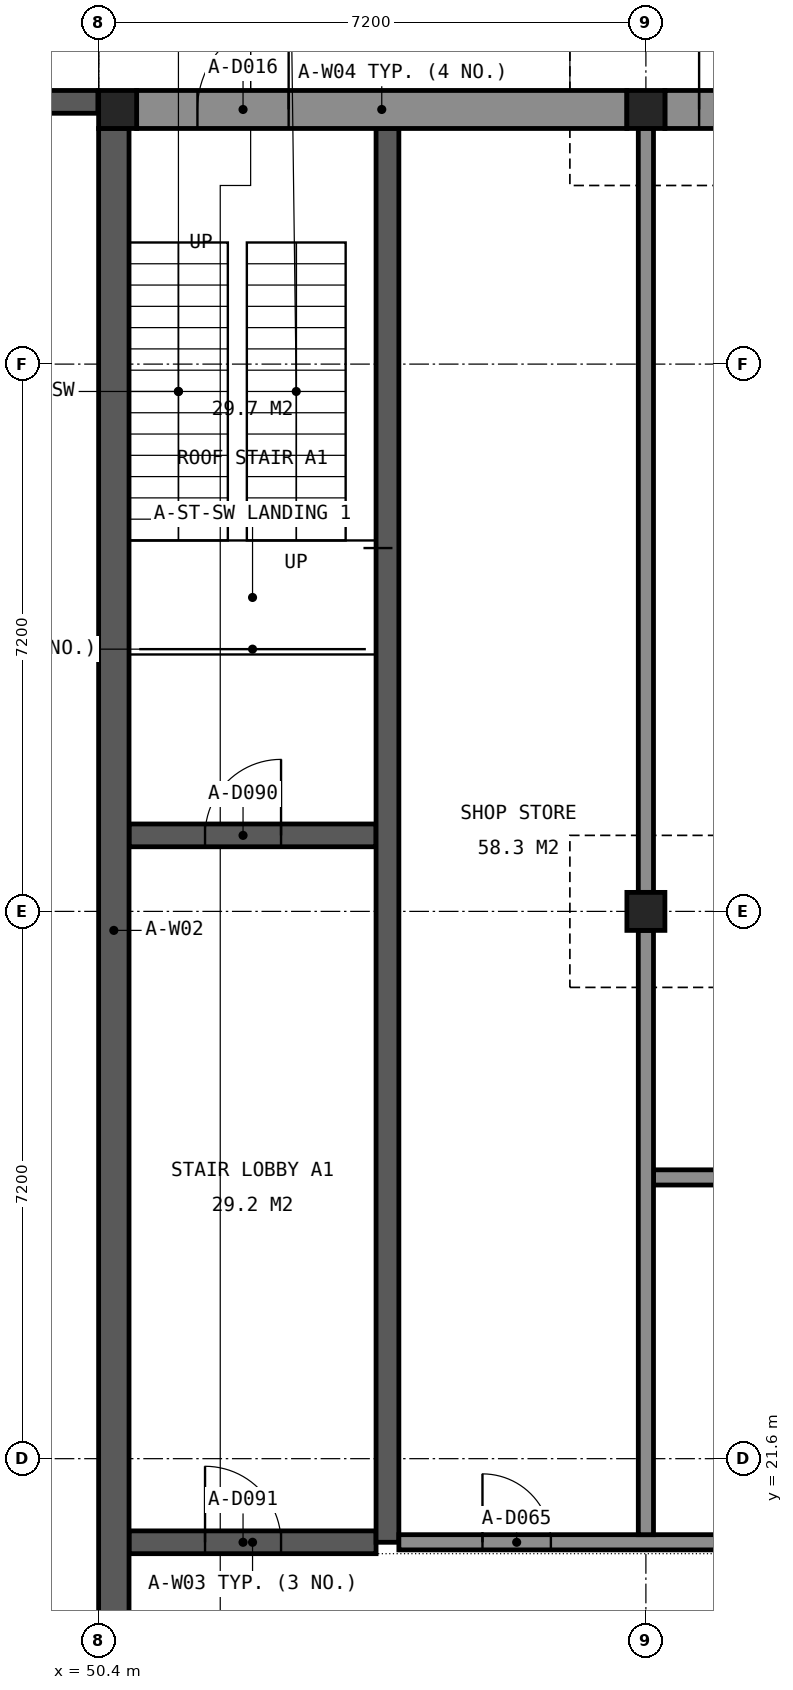
"""IFC4 building model, lengths in metres.
Left out: names, types, materials, properties, quantities, classifications, styles, units other than length and angle.
Written with IfcOpenShell. Run it as: python <this file> out.ifc"""

import sys

from ifc_helpers import new_model, si_unit, direction, frame, frame_2d, origin, origin_2d, place, context, subcontext, project, spatial, rectangle, extrude, element, fill, save


model = new_model("IFC4")
c1 = context("Model", 3, precision=1e-05, world=origin(), true_north=direction((0.0, 1.0)))
c2 = subcontext(c1, "Body", "Model", "MODEL_VIEW")
j1 = project(units=[si_unit("LENGTHUNIT", "METRE"), si_unit("PLANEANGLEUNIT", "RADIAN")], contexts=[c1])
p1 = place(None, origin())
s1 = spatial("IfcSite", under=j1, at=p1, CompositionType="ELEMENT")
p2 = place(p1, origin())
s2 = spatial("IfcBuilding", under=s1, at=p2, CompositionType="ELEMENT")
p3 = place(p2, origin())
s3 = spatial("IfcBuildingStorey", under=s2, at=p3, CompositionType="ELEMENT", Elevation=0.0)
for number, where, z_axis, x_axis in (
    (1, (50.65, 39.35, 0.0), (0.0, 0.0, 1.0), (1.0, 0.0, 0.0)),
    (2, (57.6, 39.35, 0.0), (0.0, 0.0, 1.0), (1.0, 0.0, 0.0)),
    (3, (57.6, 28.8, 0.0), (0.0, 0.0, 1.0), (1.0, 0.0, 0.0)),
):
    element("IfcColumn", number, at=place(p3, frame(where, z_axis=z_axis, x_axis=x_axis)), inside=s3, PredefinedType="COLUMN", context=c2, shape_type="SweptSolid", body=[
        extrude(rectangle(XDim=0.5, YDim=0.5, at=origin_2d()), origin(), (0.0, 0.0, 1.0), 3.7),
    ])
p4 = place(p3, frame((50.8, 20.5, 0.0), z_axis=(0.0, 0.0, 1.0), x_axis=(1.0, 0.0, 0.0)))
e4 = element("IfcWall", 4, at=p4, inside=s3, PredefinedType="SHEAR", context=c2, shape_type="SweptSolid", body=[
    extrude(rectangle(XDim=3.25, YDim=0.3, at=frame_2d((1.625, 0.0))), origin(), (0.0, 0.0, 1.0), 4.4),
])
p5 = place(p4, frame((1.0, 0.0, 0.0)))
e5 = element("IfcOpeningElement", 5, at=p5, cuts=e4, PredefinedType="OPENING", context=c2, shape_type="SweptSolid", body=[
    extrude(rectangle(XDim=1.0, YDim=2.1, at=frame_2d((0.5, 1.05))), frame((0.0, 0.16, 0.0), z_axis=(0.0, -1.0, 0.0), x_axis=(1.0, 0.0, 0.0)), (0.0, 0.0, 1.0), 0.32),
])
p6 = place(p3, frame((50.8, 29.8, 0.0), z_axis=(0.0, 0.0, 1.0), x_axis=(1.0, 0.0, 0.0)))
e6 = element("IfcWall", 6, at=p6, inside=s3, PredefinedType="SHEAR", context=c2, shape_type="SweptSolid", body=[
    extrude(rectangle(XDim=3.25, YDim=0.3, at=frame_2d((1.625, 0.0))), origin(), (0.0, 0.0, 1.0), 4.4),
])
p7 = place(p6, frame((1.0, 0.0, 0.0)))
e7 = element("IfcOpeningElement", 7, at=p7, cuts=e6, PredefinedType="OPENING", context=c2, shape_type="SweptSolid", body=[
    extrude(rectangle(XDim=1.0, YDim=2.1, at=frame_2d((0.5, 1.05))), frame((0.0, 0.16, 0.0), z_axis=(0.0, -1.0, 0.0), x_axis=(1.0, 0.0, 0.0)), (0.0, 0.0, 1.0), 0.32),
])
p8 = place(p3, frame((50.6, 18.0, 0.0), z_axis=(0.0, 0.0, 1.0), x_axis=(0.0, 1.0, 0.0)))
e8 = element("IfcWall", 8, at=p8, inside=s3, PredefinedType="SHEAR", context=c2, shape_type="SweptSolid", body=[
    extrude(rectangle(XDim=21.1, YDim=0.4, at=frame_2d((10.55, 0.0))), origin(), (0.0, 0.0, 1.0), 4.4),
])
p9 = place(p3, frame((54.2, 20.5, 0.0), z_axis=(0.0, 0.0, 1.0), x_axis=(0.0, 1.0, 0.0)))
e9 = element("IfcWall", 9, at=p9, inside=s3, PredefinedType="SHEAR", context=c2, shape_type="SweptSolid", body=[
    extrude(rectangle(XDim=18.6, YDim=0.3, at=frame_2d((9.3, 0.0))), origin(), (0.0, 0.0, 1.0), 4.4),
])
p10 = place(p3, frame((43.21, 39.45, -0.25), z_axis=(0.0, 0.0, 1.0), x_axis=(1.0, 0.0, 0.0)))
e10 = element("IfcWall", 10, at=p10, inside=s3, PredefinedType="SOLIDWALL", context=c2, shape_type="SweptSolid", body=[
    extrude(rectangle(XDim=7.18, YDim=0.3, at=frame_2d((3.59, 0.0))), origin(), (0.0, 0.0, 1.0), 6.15),
])
p11 = place(p3, frame((50.9, 39.35, 0.0), z_axis=(0.0, 0.0, 1.0), x_axis=(1.0, 0.0, 0.0)))
e11 = element("IfcWall", 11, at=p11, inside=s3, PredefinedType="SOLIDWALL", context=c2, shape_type="SweptSolid", body=[
    extrude(rectangle(XDim=6.45, YDim=0.5, at=frame_2d((3.225, 0.0))), origin(), (0.0, 0.0, 1.0), 3.6),
])
p12 = place(p11, frame((0.8, 0.0, 0.0)))
e12 = element("IfcOpeningElement", 12, at=p12, cuts=e11, PredefinedType="OPENING", context=c2, shape_type="SweptSolid", body=[
    extrude(rectangle(XDim=1.2, YDim=2.1, at=frame_2d((0.6, 1.05))), frame((0.0, 0.26, 0.0), z_axis=(0.0, -1.0, 0.0), x_axis=(1.0, 0.0, 0.0)), (0.0, 0.0, 1.0), 0.52),
])
p13 = place(p3, frame((57.85, 39.35, 0.0), z_axis=(0.0, 0.0, 1.0), x_axis=(1.0, 0.0, 0.0)))
e13 = element("IfcWall", 13, at=p13, inside=s3, PredefinedType="SOLIDWALL", context=c2, shape_type="SweptSolid", body=[
    extrude(rectangle(XDim=6.7, YDim=0.5, at=frame_2d((3.35, 0.0))), origin(), (0.0, 0.0, 1.0), 3.6),
])
p14 = place(p13, frame((0.45, 0.0, 0.0)))
e14 = element("IfcOpeningElement", 14, at=p14, cuts=e13, PredefinedType="OPENING", context=c2, shape_type="SweptSolid", body=[
    extrude(rectangle(XDim=1.8, YDim=2.4, at=frame_2d((0.9, 1.2))), frame((0.0, 0.26, 0.0), z_axis=(0.0, -1.0, 0.0), x_axis=(1.0, 0.0, 0.0)), (0.0, 0.0, 1.0), 0.52),
])
p15 = place(p13, frame((2.6, 0.0, 0.6)))
e15 = element("IfcOpeningElement", 15, at=p15, cuts=e13, PredefinedType="OPENING", context=c2, shape_type="SweptSolid", body=[
    extrude(rectangle(XDim=3.0, YDim=2.4, at=frame_2d((1.5, 1.2))), frame((0.0, 0.26, 0.0), z_axis=(0.0, -1.0, 0.0), x_axis=(1.0, 0.0, 0.0)), (0.0, 0.0, 1.0), 0.52),
])
p16 = place(p3, frame((54.35, 20.5, 0.0), z_axis=(0.0, 0.0, 1.0), x_axis=(1.0, 0.0, 0.0)))
e16 = element("IfcWall", 16, at=p16, inside=s3, PredefinedType="PARTITIONING", context=c2, shape_type="SweptSolid", body=[
    extrude(rectangle(XDim=92.9, YDim=0.2, at=frame_2d((46.45, 0.0))), origin(), (0.0, 0.0, 1.0), 3.5),
])
p17 = place(p16, frame((1.1, 0.0, 0.0)))
e17 = element("IfcOpeningElement", 17, at=p17, cuts=e16, PredefinedType="OPENING", context=c2, shape_type="SweptSolid", body=[
    extrude(rectangle(XDim=0.9, YDim=2.1, at=frame_2d((0.45, 1.05))), frame((0.0, 0.11, 0.0), z_axis=(0.0, -1.0, 0.0), x_axis=(1.0, 0.0, 0.0)), (0.0, 0.0, 1.0), 0.22),
])
p18 = place(p16, frame((90.9, 0.0, 0.0)))
e18 = element("IfcOpeningElement", 18, at=p18, cuts=e16, PredefinedType="OPENING", context=c2, shape_type="SweptSolid", body=[
    extrude(rectangle(XDim=0.9, YDim=2.1, at=frame_2d((0.45, 1.05))), frame((0.0, 0.11, 0.0), z_axis=(0.0, -1.0, 0.0), x_axis=(1.0, 0.0, 0.0)), (0.0, 0.0, 1.0), 0.22),
])
p19 = place(p16, frame((6.35, 0.0, 0.0)))
e19 = element("IfcOpeningElement", 19, at=p19, cuts=e16, PredefinedType="OPENING", context=c2, shape_type="SweptSolid", body=[
    extrude(rectangle(XDim=1.0, YDim=2.1, at=frame_2d((0.5, 1.05))), frame((0.0, 0.11, 0.0), z_axis=(0.0, -1.0, 0.0), x_axis=(1.0, 0.0, 0.0)), (0.0, 0.0, 1.0), 0.22),
])
p20 = place(p16, frame((13.55, 0.0, 0.0)))
e20 = element("IfcOpeningElement", 20, at=p20, cuts=e16, PredefinedType="OPENING", context=c2, shape_type="SweptSolid", body=[
    extrude(rectangle(XDim=1.0, YDim=2.1, at=frame_2d((0.5, 1.05))), frame((0.0, 0.11, 0.0), z_axis=(0.0, -1.0, 0.0), x_axis=(1.0, 0.0, 0.0)), (0.0, 0.0, 1.0), 0.22),
])
p21 = place(p16, frame((20.75, 0.0, 0.0)))
e21 = element("IfcOpeningElement", 21, at=p21, cuts=e16, PredefinedType="OPENING", context=c2, shape_type="SweptSolid", body=[
    extrude(rectangle(XDim=1.0, YDim=2.1, at=frame_2d((0.5, 1.05))), frame((0.0, 0.11, 0.0), z_axis=(0.0, -1.0, 0.0), x_axis=(1.0, 0.0, 0.0)), (0.0, 0.0, 1.0), 0.22),
])
p22 = place(p16, frame((27.95, 0.0, 0.0)))
e22 = element("IfcOpeningElement", 22, at=p22, cuts=e16, PredefinedType="OPENING", context=c2, shape_type="SweptSolid", body=[
    extrude(rectangle(XDim=1.0, YDim=2.1, at=frame_2d((0.5, 1.05))), frame((0.0, 0.11, 0.0), z_axis=(0.0, -1.0, 0.0), x_axis=(1.0, 0.0, 0.0)), (0.0, 0.0, 1.0), 0.22),
])
p23 = place(p16, frame((35.15, 0.0, 0.0)))
e23 = element("IfcOpeningElement", 23, at=p23, cuts=e16, PredefinedType="OPENING", context=c2, shape_type="SweptSolid", body=[
    extrude(rectangle(XDim=1.0, YDim=2.1, at=frame_2d((0.5, 1.05))), frame((0.0, 0.11, 0.0), z_axis=(0.0, -1.0, 0.0), x_axis=(1.0, 0.0, 0.0)), (0.0, 0.0, 1.0), 0.22),
])
p24 = place(p16, frame((42.35, 0.0, 0.0)))
e24 = element("IfcOpeningElement", 24, at=p24, cuts=e16, PredefinedType="OPENING", context=c2, shape_type="SweptSolid", body=[
    extrude(rectangle(XDim=1.0, YDim=2.1, at=frame_2d((0.5, 1.05))), frame((0.0, 0.11, 0.0), z_axis=(0.0, -1.0, 0.0), x_axis=(1.0, 0.0, 0.0)), (0.0, 0.0, 1.0), 0.22),
])
p25 = place(p16, frame((49.55, 0.0, 0.0)))
e25 = element("IfcOpeningElement", 25, at=p25, cuts=e16, PredefinedType="OPENING", context=c2, shape_type="SweptSolid", body=[
    extrude(rectangle(XDim=1.0, YDim=2.1, at=frame_2d((0.5, 1.05))), frame((0.0, 0.11, 0.0), z_axis=(0.0, -1.0, 0.0), x_axis=(1.0, 0.0, 0.0)), (0.0, 0.0, 1.0), 0.22),
])
p26 = place(p16, frame((56.75, 0.0, 0.0)))
e26 = element("IfcOpeningElement", 26, at=p26, cuts=e16, PredefinedType="OPENING", context=c2, shape_type="SweptSolid", body=[
    extrude(rectangle(XDim=1.0, YDim=2.1, at=frame_2d((0.5, 1.05))), frame((0.0, 0.11, 0.0), z_axis=(0.0, -1.0, 0.0), x_axis=(1.0, 0.0, 0.0)), (0.0, 0.0, 1.0), 0.22),
])
p27 = place(p16, frame((63.95, 0.0, 0.0)))
e27 = element("IfcOpeningElement", 27, at=p27, cuts=e16, PredefinedType="OPENING", context=c2, shape_type="SweptSolid", body=[
    extrude(rectangle(XDim=1.0, YDim=2.1, at=frame_2d((0.5, 1.05))), frame((0.0, 0.11, 0.0), z_axis=(0.0, -1.0, 0.0), x_axis=(1.0, 0.0, 0.0)), (0.0, 0.0, 1.0), 0.22),
])
p28 = place(p16, frame((71.15, 0.0, 0.0)))
e28 = element("IfcOpeningElement", 28, at=p28, cuts=e16, PredefinedType="OPENING", context=c2, shape_type="SweptSolid", body=[
    extrude(rectangle(XDim=1.0, YDim=2.1, at=frame_2d((0.5, 1.05))), frame((0.0, 0.11, 0.0), z_axis=(0.0, -1.0, 0.0), x_axis=(1.0, 0.0, 0.0)), (0.0, 0.0, 1.0), 0.22),
])
p29 = place(p16, frame((78.35, 0.0, 0.0)))
e29 = element("IfcOpeningElement", 29, at=p29, cuts=e16, PredefinedType="OPENING", context=c2, shape_type="SweptSolid", body=[
    extrude(rectangle(XDim=1.0, YDim=2.1, at=frame_2d((0.5, 1.05))), frame((0.0, 0.11, 0.0), z_axis=(0.0, -1.0, 0.0), x_axis=(1.0, 0.0, 0.0)), (0.0, 0.0, 1.0), 0.22),
])
p30 = place(p16, frame((85.55, 0.0, 0.0)))
e30 = element("IfcOpeningElement", 30, at=p30, cuts=e16, PredefinedType="OPENING", context=c2, shape_type="SweptSolid", body=[
    extrude(rectangle(XDim=1.0, YDim=2.1, at=frame_2d((0.5, 1.05))), frame((0.0, 0.11, 0.0), z_axis=(0.0, -1.0, 0.0), x_axis=(1.0, 0.0, 0.0)), (0.0, 0.0, 1.0), 0.22),
])
p31 = place(p3, frame((57.7, 25.3, 0.0), z_axis=(0.0, 0.0, 1.0), x_axis=(1.0, 0.0, 0.0)))
e31 = element("IfcWall", 31, at=p31, inside=s3, PredefinedType="PARTITIONING", context=c2, shape_type="SweptSolid", body=[
    extrude(rectangle(XDim=86.2, YDim=0.2, at=frame_2d((43.1, 0.0))), origin(), (0.0, 0.0, 1.0), 3.5),
])
p32 = place(p31, frame((3.0, 0.0, 0.0)))
e32 = element("IfcOpeningElement", 32, at=p32, cuts=e31, PredefinedType="OPENING", context=c2, shape_type="SweptSolid", body=[
    extrude(rectangle(XDim=1.0, YDim=2.1, at=frame_2d((0.5, 1.05))), frame((0.0, 0.11, 0.0), z_axis=(0.0, -1.0, 0.0), x_axis=(1.0, 0.0, 0.0)), (0.0, 0.0, 1.0), 0.22),
])
p33 = place(p31, frame((10.2, 0.0, 0.0)))
e33 = element("IfcOpeningElement", 33, at=p33, cuts=e31, PredefinedType="OPENING", context=c2, shape_type="SweptSolid", body=[
    extrude(rectangle(XDim=1.0, YDim=2.1, at=frame_2d((0.5, 1.05))), frame((0.0, 0.11, 0.0), z_axis=(0.0, -1.0, 0.0), x_axis=(1.0, 0.0, 0.0)), (0.0, 0.0, 1.0), 0.22),
])
p34 = place(p31, frame((17.4, 0.0, 0.0)))
e34 = element("IfcOpeningElement", 34, at=p34, cuts=e31, PredefinedType="OPENING", context=c2, shape_type="SweptSolid", body=[
    extrude(rectangle(XDim=1.0, YDim=2.1, at=frame_2d((0.5, 1.05))), frame((0.0, 0.11, 0.0), z_axis=(0.0, -1.0, 0.0), x_axis=(1.0, 0.0, 0.0)), (0.0, 0.0, 1.0), 0.22),
])
p35 = place(p31, frame((24.6, 0.0, 0.0)))
e35 = element("IfcOpeningElement", 35, at=p35, cuts=e31, PredefinedType="OPENING", context=c2, shape_type="SweptSolid", body=[
    extrude(rectangle(XDim=1.0, YDim=2.1, at=frame_2d((0.5, 1.05))), frame((0.0, 0.11, 0.0), z_axis=(0.0, -1.0, 0.0), x_axis=(1.0, 0.0, 0.0)), (0.0, 0.0, 1.0), 0.22),
])
p36 = place(p31, frame((31.8, 0.0, 0.0)))
e36 = element("IfcOpeningElement", 36, at=p36, cuts=e31, PredefinedType="OPENING", context=c2, shape_type="SweptSolid", body=[
    extrude(rectangle(XDim=1.0, YDim=2.1, at=frame_2d((0.5, 1.05))), frame((0.0, 0.11, 0.0), z_axis=(0.0, -1.0, 0.0), x_axis=(1.0, 0.0, 0.0)), (0.0, 0.0, 1.0), 0.22),
])
p37 = place(p31, frame((39.0, 0.0, 0.0)))
e37 = element("IfcOpeningElement", 37, at=p37, cuts=e31, PredefinedType="OPENING", context=c2, shape_type="SweptSolid", body=[
    extrude(rectangle(XDim=1.0, YDim=2.1, at=frame_2d((0.5, 1.05))), frame((0.0, 0.11, 0.0), z_axis=(0.0, -1.0, 0.0), x_axis=(1.0, 0.0, 0.0)), (0.0, 0.0, 1.0), 0.22),
])
p38 = place(p31, frame((46.2, 0.0, 0.0)))
e38 = element("IfcOpeningElement", 38, at=p38, cuts=e31, PredefinedType="OPENING", context=c2, shape_type="SweptSolid", body=[
    extrude(rectangle(XDim=1.0, YDim=2.1, at=frame_2d((0.5, 1.05))), frame((0.0, 0.11, 0.0), z_axis=(0.0, -1.0, 0.0), x_axis=(1.0, 0.0, 0.0)), (0.0, 0.0, 1.0), 0.22),
])
p39 = place(p31, frame((53.4, 0.0, 0.0)))
e39 = element("IfcOpeningElement", 39, at=p39, cuts=e31, PredefinedType="OPENING", context=c2, shape_type="SweptSolid", body=[
    extrude(rectangle(XDim=1.0, YDim=2.1, at=frame_2d((0.5, 1.05))), frame((0.0, 0.11, 0.0), z_axis=(0.0, -1.0, 0.0), x_axis=(1.0, 0.0, 0.0)), (0.0, 0.0, 1.0), 0.22),
])
p40 = place(p31, frame((60.6, 0.0, 0.0)))
e40 = element("IfcOpeningElement", 40, at=p40, cuts=e31, PredefinedType="OPENING", context=c2, shape_type="SweptSolid", body=[
    extrude(rectangle(XDim=1.0, YDim=2.1, at=frame_2d((0.5, 1.05))), frame((0.0, 0.11, 0.0), z_axis=(0.0, -1.0, 0.0), x_axis=(1.0, 0.0, 0.0)), (0.0, 0.0, 1.0), 0.22),
])
p41 = place(p31, frame((67.8, 0.0, 0.0)))
e41 = element("IfcOpeningElement", 41, at=p41, cuts=e31, PredefinedType="OPENING", context=c2, shape_type="SweptSolid", body=[
    extrude(rectangle(XDim=1.0, YDim=2.1, at=frame_2d((0.5, 1.05))), frame((0.0, 0.11, 0.0), z_axis=(0.0, -1.0, 0.0), x_axis=(1.0, 0.0, 0.0)), (0.0, 0.0, 1.0), 0.22),
])
p42 = place(p31, frame((75.0, 0.0, 0.0)))
e42 = element("IfcOpeningElement", 42, at=p42, cuts=e31, PredefinedType="OPENING", context=c2, shape_type="SweptSolid", body=[
    extrude(rectangle(XDim=1.0, YDim=2.1, at=frame_2d((0.5, 1.05))), frame((0.0, 0.11, 0.0), z_axis=(0.0, -1.0, 0.0), x_axis=(1.0, 0.0, 0.0)), (0.0, 0.0, 1.0), 0.22),
])
p43 = place(p31, frame((84.65, 0.0, 0.0)))
e43 = element("IfcOpeningElement", 43, at=p43, cuts=e31, PredefinedType="OPENING", context=c2, shape_type="SweptSolid", body=[
    extrude(rectangle(XDim=0.9, YDim=2.1, at=frame_2d((0.45, 1.05))), frame((0.0, 0.11, 0.0), z_axis=(0.0, -1.0, 0.0), x_axis=(1.0, 0.0, 0.0)), (0.0, 0.0, 1.0), 0.22),
])
p44 = place(p3, frame((57.6, 20.6, 0.0), z_axis=(0.0, 0.0, 1.0), x_axis=(0.0, 1.0, 0.0)))
e44 = element("IfcWall", 44, at=p44, inside=s3, PredefinedType="PARTITIONING", context=c2, shape_type="SweptSolid", body=[
    extrude(rectangle(XDim=7.95, YDim=0.2, at=frame_2d((3.975, 0.0))), origin(), (0.0, 0.0, 1.0), 3.5),
])
p45 = place(p3, frame((57.6, 29.05, 0.0), z_axis=(0.0, 0.0, 1.0), x_axis=(0.0, 1.0, 0.0)))
e45 = element("IfcWall", 45, at=p45, inside=s3, PredefinedType="PARTITIONING", context=c2, shape_type="SweptSolid", body=[
    extrude(rectangle(XDim=10.05, YDim=0.2, at=frame_2d((5.025, 0.0))), origin(), (0.0, 0.0, 1.0), 3.5),
])
p46 = place(p12, origin())
e46 = element("IfcDoor", 46, at=p46, inside=s3, OperationType="SINGLE_SWING_RIGHT", PredefinedType="DOOR", context=c2, shape_type="SweptSolid", body=[
    extrude(rectangle(XDim=1.2, YDim=2.1, at=frame_2d((0.6, 1.05))), frame((0.0, 0.025, 0.0), z_axis=(0.0, -1.0, 0.0), x_axis=(1.0, 0.0, 0.0)), (0.0, 0.0, 1.0), 0.05),
])
fill(e12, e46)
p47 = place(p14, origin())
e47 = element("IfcDoor", 47, at=p47, inside=s3, OperationType="DOUBLE_DOOR_DOUBLE_SWING", PredefinedType="DOOR", context=c2, shape_type="SweptSolid", body=[
    extrude(rectangle(XDim=1.8, YDim=2.4, at=frame_2d((0.9, 1.2))), frame((0.0, 0.025, 0.0), z_axis=(0.0, -1.0, 0.0), x_axis=(1.0, 0.0, 0.0)), (0.0, 0.0, 1.0), 0.05),
])
fill(e14, e47)
p48 = place(p17, origin())
e48 = element("IfcDoor", 48, at=p48, inside=s3, OperationType="SINGLE_SWING_LEFT", PredefinedType="DOOR", context=c2, shape_type="SweptSolid", body=[
    extrude(rectangle(XDim=0.9, YDim=2.1, at=frame_2d((0.45, 1.05))), frame((0.0, 0.025, 0.0), z_axis=(0.0, -1.0, 0.0), x_axis=(1.0, 0.0, 0.0)), (0.0, 0.0, 1.0), 0.05),
])
fill(e17, e48)
p49 = place(p7, origin())
e49 = element("IfcDoor", 49, at=p49, inside=s3, OperationType="SINGLE_SWING_RIGHT", PredefinedType="DOOR", context=c2, shape_type="SweptSolid", body=[
    extrude(rectangle(XDim=1.0, YDim=2.1, at=frame_2d((0.5, 1.05))), frame((0.0, 0.025, 0.0), z_axis=(0.0, -1.0, 0.0), x_axis=(1.0, 0.0, 0.0)), (0.0, 0.0, 1.0), 0.05),
])
fill(e7, e49)
p50 = place(p5, origin())
e50 = element("IfcDoor", 50, at=p50, inside=s3, OperationType="SINGLE_SWING_LEFT", PredefinedType="DOOR", context=c2, shape_type="SweptSolid", body=[
    extrude(rectangle(XDim=1.0, YDim=2.1, at=frame_2d((0.5, 1.05))), frame((0.0, 0.025, 0.0), z_axis=(0.0, -1.0, 0.0), x_axis=(1.0, 0.0, 0.0)), (0.0, 0.0, 1.0), 0.05),
])
fill(e5, e50)
save(model, sys.argv[1])
